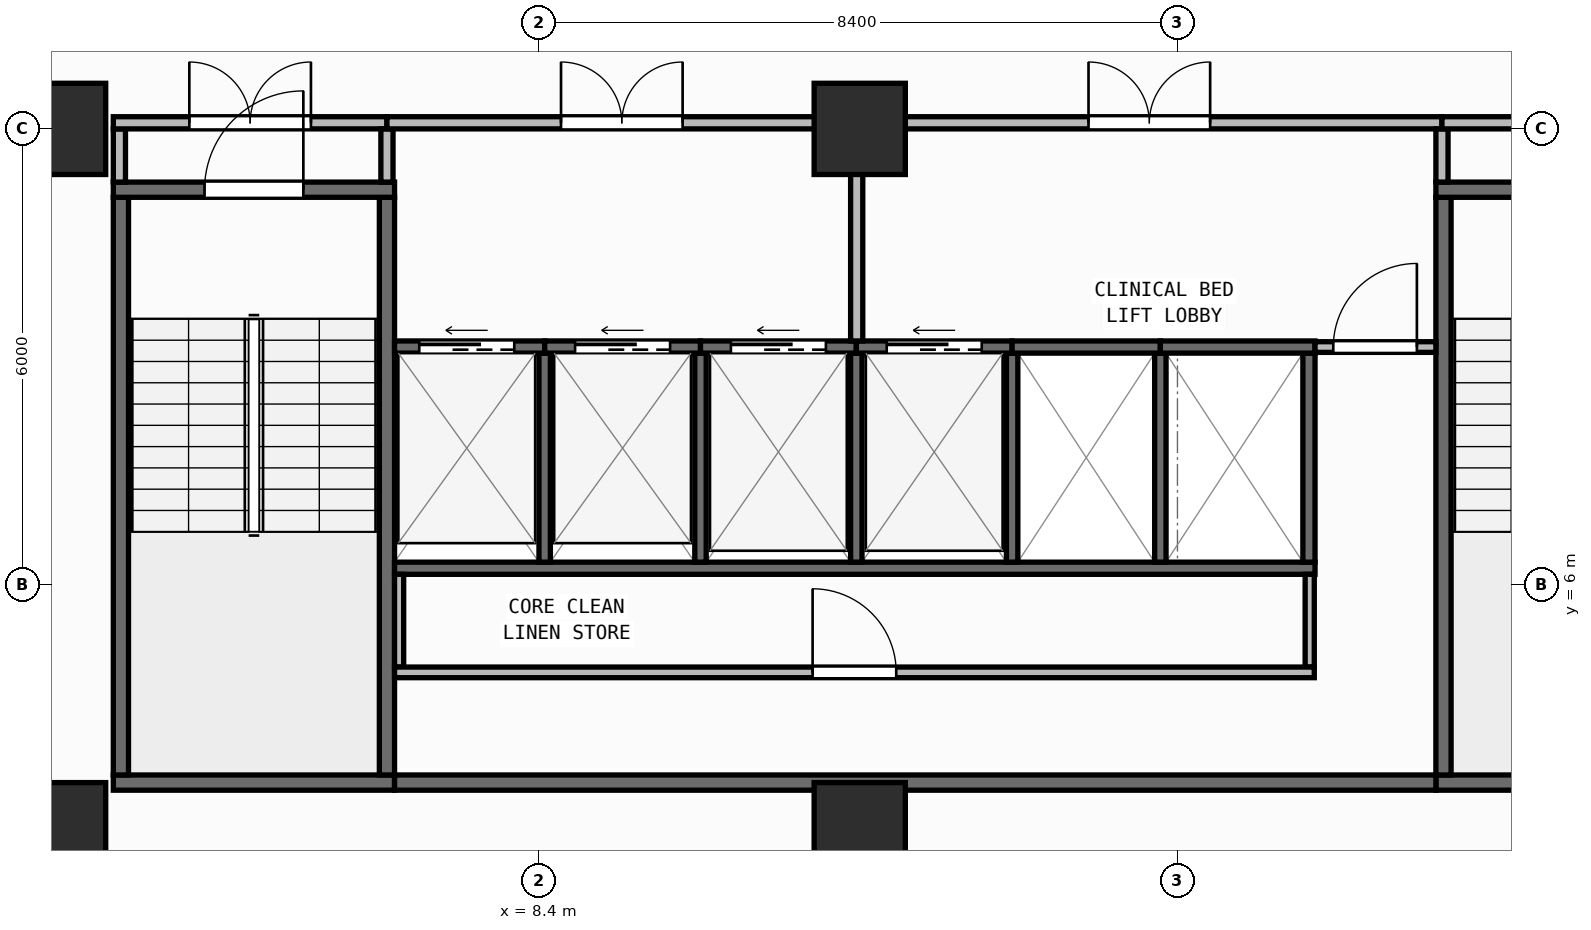
"""IFC4 building model, lengths in metres.
Left out: names, types, materials, properties, quantities, classifications, styles, units other than length and angle.
Written with IfcOpenShell. Run it as: python <this file> out.ifc"""

import sys

from ifc_helpers import new_model, si_unit, direction, frame, frame_2d, origin, origin_2d, place, context, subcontext, project, spatial, rectangle, extrude, element, fill, save


model = new_model("IFC4")
c1 = context("Model", 3, precision=1e-05, world=origin(), true_north=direction((0.0, 1.0)))
c2 = subcontext(c1, "Body", "Model", "MODEL_VIEW")
j1 = project(units=[si_unit("LENGTHUNIT", "METRE"), si_unit("PLANEANGLEUNIT", "RADIAN")], contexts=[c1])
p1 = place(None, origin())
s1 = spatial("IfcSite", under=j1, at=p1, CompositionType="ELEMENT")
p2 = place(p1, origin())
s2 = spatial("IfcBuilding", under=s1, at=p2, CompositionType="ELEMENT")
p3 = place(p2, frame((0.0, 0.0, 154.7)))
s3 = spatial("IfcBuildingStorey", under=s2, at=p3, CompositionType="ELEMENT", Elevation=154.7)
for number, where, z_axis, x_axis in (
    (1, (2.1, 2.8, 0.0), (0.0, 0.0, 1.0), (1.0, 0.0, 0.0)),
    (2, (12.62, 2.8, 0.0), (0.0, 0.0, 1.0), (1.0, 0.0, 0.0)),
    (3, (2.1, 12.0, 0.0), (0.0, 0.0, 1.0), (1.0, 0.0, 0.0)),
    (4, (12.62, 12.0, 0.0), (0.0, 0.0, 1.0), (1.0, 0.0, 0.0)),
):
    element("IfcColumn", number, at=place(p3, frame(where, z_axis=z_axis, x_axis=x_axis)), inside=s3, PredefinedType="COLUMN", context=c2, shape_type="SweptSolid", body=[
        extrude(rectangle(XDim=1.2, YDim=1.2, at=origin_2d()), origin(), (0.0, 0.0, 1.0), 3.95),
    ])
p4 = place(p3, frame((2.76, 0.173, 0.0), z_axis=(0.0, 0.0, 1.0), x_axis=(0.996857931723, 0.079210251617, 0.0)))
e5 = element("IfcWall", 5, at=p4, inside=s3, PredefinedType="STANDARD", context=c2, shape_type="SweptSolid", body=[
    extrude(rectangle(XDim=51.442, YDim=0.26, at=frame_2d((25.721, 0.0))), origin(), (0.0, 0.0, 1.0), 3.71),
])
p5 = place(p4, frame((24.521, 0.0, 0.9)))
e6 = element("IfcOpeningElement", 6, at=p5, cuts=e5, PredefinedType="OPENING", context=c2, shape_type="SweptSolid", body=[
    extrude(rectangle(XDim=2.4, YDim=1.65, at=frame_2d((1.2, 0.825))), frame((0.0, 0.14, 0.0), z_axis=(0.0, -1.0, 0.0), x_axis=(1.0, 0.0, 0.0)), (0.0, 0.0, 1.0), 0.28),
])
p6 = place(p3, frame((2.8, 3.4, 0.0), z_axis=(0.0, 0.0, 1.0), x_axis=(1.0, 0.0, 0.0)))
e7 = element("IfcWall", 7, at=p6, inside=s3, PredefinedType="SHEAR", context=c2, shape_type="SweptSolid", body=[
    extrude(rectangle(XDim=3.7, YDim=0.2, at=frame_2d((1.85, 0.0))), origin(), (0.0, 0.0, 1.0), 3.71),
])
for number, where, z_axis, x_axis in (
    (8, (2.9, 3.5, 0.0), (0.0, 0.0, 1.0), (0.0, 1.0, 0.0)),
    (9, (6.4, 3.5, 0.0), (0.0, 0.0, 1.0), (0.0, 1.0, 0.0)),
):
    element("IfcWall", number, at=place(p3, frame(where, z_axis=z_axis, x_axis=x_axis)), inside=s3, PredefinedType="SHEAR", context=c2, shape_type="SweptSolid", body=[
        extrude(rectangle(XDim=7.6, YDim=0.2, at=frame_2d((3.8, 0.0))), origin(), (0.0, 0.0, 1.0), 3.71),
    ])
p7 = place(p3, frame((2.8, 11.2, 0.0), z_axis=(0.0, 0.0, 1.0), x_axis=(1.0, 0.0, 0.0)))
e10 = element("IfcWall", 10, at=p7, inside=s3, PredefinedType="SHEAR", context=c2, shape_type="SweptSolid", body=[
    extrude(rectangle(XDim=3.7, YDim=0.2, at=frame_2d((1.85, 0.0))), origin(), (0.0, 0.0, 1.0), 3.71),
])
p8 = place(p7, frame((1.2, 0.0, 0.0)))
e11 = element("IfcOpeningElement", 11, at=p8, cuts=e10, PredefinedType="OPENING", context=c2, shape_type="SweptSolid", body=[
    extrude(rectangle(XDim=1.3, YDim=2.15, at=frame_2d((0.65, 1.075))), frame((0.0, 0.11, 0.0), z_axis=(0.0, -1.0, 0.0), x_axis=(1.0, 0.0, 0.0)), (0.0, 0.0, 1.0), 0.22),
])
p9 = place(p3, frame((20.2, 3.4, 0.0), z_axis=(0.0, 0.0, 1.0), x_axis=(1.0, 0.0, 0.0)))
e12 = element("IfcWall", 12, at=p9, inside=s3, PredefinedType="SHEAR", context=c2, shape_type="SweptSolid", body=[
    extrude(rectangle(XDim=3.7, YDim=0.2, at=frame_2d((1.85, 0.0))), origin(), (0.0, 0.0, 1.0), 3.71),
])
p10 = place(p3, frame((20.3, 3.5, 0.0), z_axis=(0.0, 0.0, 1.0), x_axis=(0.0, 1.0, 0.0)))
e13 = element("IfcWall", 13, at=p10, inside=s3, PredefinedType="SHEAR", context=c2, shape_type="SweptSolid", body=[
    extrude(rectangle(XDim=7.6, YDim=0.2, at=frame_2d((3.8, 0.0))), origin(), (0.0, 0.0, 1.0), 3.71),
])
p11 = place(p3, frame((20.2, 11.2, 0.0), z_axis=(0.0, 0.0, 1.0), x_axis=(1.0, 0.0, 0.0)))
e14 = element("IfcWall", 14, at=p11, inside=s3, PredefinedType="SHEAR", context=c2, shape_type="SweptSolid", body=[
    extrude(rectangle(XDim=3.7, YDim=0.2, at=frame_2d((1.85, 0.0))), origin(), (0.0, 0.0, 1.0), 3.71),
])
p12 = place(p11, frame((1.2, 0.0, 0.0)))
e15 = element("IfcOpeningElement", 15, at=p12, cuts=e14, PredefinedType="OPENING", context=c2, shape_type="SweptSolid", body=[
    extrude(rectangle(XDim=1.3, YDim=2.15, at=frame_2d((0.65, 1.075))), frame((0.0, 0.11, 0.0), z_axis=(0.0, -1.0, 0.0), x_axis=(1.0, 0.0, 0.0)), (0.0, 0.0, 1.0), 0.22),
])
p13 = place(p3, frame((6.5, 3.4, 0.0), z_axis=(0.0, 0.0, 1.0), x_axis=(1.0, 0.0, 0.0)))
e16 = element("IfcWall", 16, at=p13, inside=s3, PredefinedType="SHEAR", context=c2, shape_type="SweptSolid", body=[
    extrude(rectangle(XDim=13.7, YDim=0.2, at=frame_2d((6.85, 0.0))), origin(), (0.0, 0.0, 1.0), 3.71),
])
p14 = place(p3, frame((6.5, 6.22, 0.0), z_axis=(0.0, 0.0, 1.0), x_axis=(1.0, 0.0, 0.0)))
e17 = element("IfcWall", 17, at=p14, inside=s3, PredefinedType="SHEAR", context=c2, shape_type="SweptSolid", body=[
    extrude(rectangle(XDim=12.11, YDim=0.16, at=frame_2d((6.055, 0.0))), origin(), (0.0, 0.0, 1.0), 3.71),
])
p15 = place(p3, frame((18.53, 6.3, 0.0), z_axis=(0.0, 0.0, 1.0), x_axis=(0.0, 1.0, 0.0)))
e18 = element("IfcWall", 18, at=p15, inside=s3, PredefinedType="SHEAR", context=c2, shape_type="SweptSolid", body=[
    extrude(rectangle(XDim=2.75, YDim=0.16, at=frame_2d((1.375, 0.0))), origin(), (0.0, 0.0, 1.0), 3.71),
])
for number, where, z_axis, x_axis in (
    (19, (8.475, 6.3, 0.0), (0.0, 0.0, 1.0), (0.0, 1.0, 0.0)),
    (20, (10.525, 6.3, 0.0), (0.0, 0.0, 1.0), (0.0, 1.0, 0.0)),
    (21, (12.575, 6.3, 0.0), (0.0, 0.0, 1.0), (0.0, 1.0, 0.0)),
    (22, (14.625, 6.3, 0.0), (0.0, 0.0, 1.0), (0.0, 1.0, 0.0)),
    (23, (16.575, 6.3, 0.0), (0.0, 0.0, 1.0), (0.0, 1.0, 0.0)),
):
    element("IfcWall", number, at=place(p3, frame(where, z_axis=z_axis, x_axis=x_axis)), inside=s3, PredefinedType="SHEAR", context=c2, shape_type="SweptSolid", body=[
        extrude(rectangle(XDim=2.75, YDim=0.15, at=frame_2d((1.375, 0.0))), origin(), (0.0, 0.0, 1.0), 3.71),
    ])
p16 = place(p3, frame((6.5, 9.13, 0.0), z_axis=(0.0, 0.0, 1.0), x_axis=(1.0, 0.0, 0.0)))
e24 = element("IfcWall", 24, at=p16, inside=s3, PredefinedType="SHEAR", context=c2, shape_type="SweptSolid", body=[
    extrude(rectangle(XDim=1.975, YDim=0.16, at=frame_2d((0.988, 0.0))), origin(), (0.0, 0.0, 1.0), 3.71),
])
p17 = place(p16, frame((0.325, 0.0, 0.0)))
e25 = element("IfcOpeningElement", 25, at=p17, cuts=e24, PredefinedType="OPENING", context=c2, shape_type="SweptSolid", body=[
    extrude(rectangle(XDim=1.25, YDim=2.15, at=frame_2d((0.625, 1.075))), frame((0.0, 0.09, 0.0), z_axis=(0.0, -1.0, 0.0), x_axis=(1.0, 0.0, 0.0)), (0.0, 0.0, 1.0), 0.18),
])
p18 = place(p3, frame((8.475, 9.13, 0.0), z_axis=(0.0, 0.0, 1.0), x_axis=(1.0, 0.0, 0.0)))
e26 = element("IfcWall", 26, at=p18, inside=s3, PredefinedType="SHEAR", context=c2, shape_type="SweptSolid", body=[
    extrude(rectangle(XDim=2.05, YDim=0.16, at=frame_2d((1.025, 0.0))), origin(), (0.0, 0.0, 1.0), 3.71),
])
p19 = place(p18, frame((0.4, 0.0, 0.0)))
e27 = element("IfcOpeningElement", 27, at=p19, cuts=e26, PredefinedType="OPENING", context=c2, shape_type="SweptSolid", body=[
    extrude(rectangle(XDim=1.25, YDim=2.15, at=frame_2d((0.625, 1.075))), frame((0.0, 0.09, 0.0), z_axis=(0.0, -1.0, 0.0), x_axis=(1.0, 0.0, 0.0)), (0.0, 0.0, 1.0), 0.18),
])
p20 = place(p3, frame((10.525, 9.13, 0.0), z_axis=(0.0, 0.0, 1.0), x_axis=(1.0, 0.0, 0.0)))
e28 = element("IfcWall", 28, at=p20, inside=s3, PredefinedType="SHEAR", context=c2, shape_type="SweptSolid", body=[
    extrude(rectangle(XDim=2.05, YDim=0.16, at=frame_2d((1.025, 0.0))), origin(), (0.0, 0.0, 1.0), 3.71),
])
p21 = place(p20, frame((0.4, 0.0, 0.0)))
e29 = element("IfcOpeningElement", 29, at=p21, cuts=e28, PredefinedType="OPENING", context=c2, shape_type="SweptSolid", body=[
    extrude(rectangle(XDim=1.25, YDim=2.15, at=frame_2d((0.625, 1.075))), frame((0.0, 0.09, 0.0), z_axis=(0.0, -1.0, 0.0), x_axis=(1.0, 0.0, 0.0)), (0.0, 0.0, 1.0), 0.18),
])
p22 = place(p3, frame((12.575, 9.13, 0.0), z_axis=(0.0, 0.0, 1.0), x_axis=(1.0, 0.0, 0.0)))
e30 = element("IfcWall", 30, at=p22, inside=s3, PredefinedType="SHEAR", context=c2, shape_type="SweptSolid", body=[
    extrude(rectangle(XDim=2.05, YDim=0.16, at=frame_2d((1.025, 0.0))), origin(), (0.0, 0.0, 1.0), 3.71),
])
p23 = place(p22, frame((0.4, 0.0, 0.0)))
e31 = element("IfcOpeningElement", 31, at=p23, cuts=e30, PredefinedType="OPENING", context=c2, shape_type="SweptSolid", body=[
    extrude(rectangle(XDim=1.25, YDim=2.15, at=frame_2d((0.625, 1.075))), frame((0.0, 0.09, 0.0), z_axis=(0.0, -1.0, 0.0), x_axis=(1.0, 0.0, 0.0)), (0.0, 0.0, 1.0), 0.18),
])
p24 = place(p3, frame((14.625, 9.13, 0.0), z_axis=(0.0, 0.0, 1.0), x_axis=(1.0, 0.0, 0.0)))
e32 = element("IfcWall", 32, at=p24, inside=s3, PredefinedType="SHEAR", context=c2, shape_type="SweptSolid", body=[
    extrude(rectangle(XDim=1.95, YDim=0.16, at=frame_2d((0.975, 0.0))), origin(), (0.0, 0.0, 1.0), 3.71),
])
p25 = place(p3, frame((16.575, 9.13, 0.0), z_axis=(0.0, 0.0, 1.0), x_axis=(1.0, 0.0, 0.0)))
e33 = element("IfcWall", 33, at=p25, inside=s3, PredefinedType="SHEAR", context=c2, shape_type="SweptSolid", body=[
    extrude(rectangle(XDim=2.035, YDim=0.16, at=frame_2d((1.018, 0.0))), origin(), (0.0, 0.0, 1.0), 3.71),
])
for number, where, z_axis, x_axis in (
    (34, (6.56, 4.92, 0.0), (0.0, 0.0, 1.0), (0.0, 1.0, 0.0)),
    (35, (18.54, 4.92, 0.0), (0.0, 0.0, 1.0), (0.0, 1.0, 0.0)),
):
    element("IfcWall", number, at=place(p3, frame(where, z_axis=z_axis, x_axis=x_axis)), inside=s3, PredefinedType="PARTITIONING", context=c2, shape_type="SweptSolid", body=[
        extrude(rectangle(XDim=1.22, YDim=0.12, at=frame_2d((0.61, 0.0))), origin(), (0.0, 0.0, 1.0), 3.71),
    ])
p26 = place(p3, frame((6.5, 4.85, 0.0), z_axis=(0.0, 0.0, 1.0), x_axis=(1.0, 0.0, 0.0)))
e36 = element("IfcWall", 36, at=p26, inside=s3, PredefinedType="PARTITIONING", context=c2, shape_type="SweptSolid", body=[
    extrude(rectangle(XDim=12.1, YDim=0.14, at=frame_2d((6.05, 0.0))), origin(), (0.0, 0.0, 1.0), 3.71),
])
p27 = place(p26, frame((5.5, 0.0, 0.0)))
e37 = element("IfcOpeningElement", 37, at=p27, cuts=e36, PredefinedType="OPENING", context=c2, shape_type="SweptSolid", body=[
    extrude(rectangle(XDim=1.1, YDim=2.1, at=frame_2d((0.55, 1.05))), frame((0.0, 0.08, 0.0), z_axis=(0.0, -1.0, 0.0), x_axis=(1.0, 0.0, 0.0)), (0.0, 0.0, 1.0), 0.16),
])
p28 = place(p3, frame((18.61, 9.13, 0.0), z_axis=(0.0, 0.0, 1.0), x_axis=(1.0, 0.0, 0.0)))
e38 = element("IfcWall", 38, at=p28, inside=s3, PredefinedType="PARTITIONING", context=c2, shape_type="SweptSolid", body=[
    extrude(rectangle(XDim=1.59, YDim=0.14, at=frame_2d((0.795, 0.0))), origin(), (0.0, 0.0, 1.0), 3.71),
])
p29 = place(p28, frame((0.24, 0.0, 0.0)))
e39 = element("IfcOpeningElement", 39, at=p29, cuts=e38, PredefinedType="OPENING", context=c2, shape_type="SweptSolid", body=[
    extrude(rectangle(XDim=1.1, YDim=2.1, at=frame_2d((0.55, 1.05))), frame((0.0, 0.08, 0.0), z_axis=(0.0, -1.0, 0.0), x_axis=(1.0, 0.0, 0.0)), (0.0, 0.0, 1.0), 0.16),
])
p30 = place(p3, frame((2.88, 11.3, 0.0), z_axis=(0.0, 0.0, 1.0), x_axis=(0.0, 1.0, 0.0)))
e40 = element("IfcWall", 40, at=p30, inside=s3, PredefinedType="PARTITIONING", context=c2, shape_type="SweptSolid", body=[
    extrude(rectangle(XDim=0.7, YDim=0.16, at=frame_2d((0.35, 0.0))), origin(), (0.0, 0.0, 1.0), 3.71),
])
p31 = place(p3, frame((2.8, 12.08, 0.0), z_axis=(0.0, 0.0, 1.0), x_axis=(1.0, 0.0, 0.0)))
e41 = element("IfcWall", 41, at=p31, inside=s3, PredefinedType="PARTITIONING", context=c2, shape_type="SweptSolid", body=[
    extrude(rectangle(XDim=3.6, YDim=0.16, at=frame_2d((1.8, 0.0))), origin(), (0.0, 0.0, 1.0), 3.083),
])
p32 = place(p31, frame((1.0, 0.0, 0.0)))
e42 = element("IfcOpeningElement", 42, at=p32, cuts=e41, PredefinedType="OPENING", context=c2, shape_type="SweptSolid", body=[
    extrude(rectangle(XDim=1.6, YDim=2.05, at=frame_2d((0.8, 1.025))), frame((0.0, 0.09, 0.0), z_axis=(0.0, -1.0, 0.0), x_axis=(1.0, 0.0, 0.0)), (0.0, 0.0, 1.0), 0.18),
])
p33 = place(p3, frame((6.4, 11.3, 0.0), z_axis=(0.0, 0.0, 1.0), x_axis=(0.0, 1.0, 0.0)))
e43 = element("IfcWall", 43, at=p33, inside=s3, PredefinedType="PARTITIONING", context=c2, shape_type="SweptSolid", body=[
    extrude(rectangle(XDim=0.7, YDim=0.16, at=frame_2d((0.35, 0.0))), origin(), (0.0, 0.0, 1.0), 3.71),
])
p34 = place(p3, frame((6.4, 12.08, 0.0), z_axis=(0.0, 0.0, 1.0), x_axis=(1.0, 0.0, 0.0)))
e44 = element("IfcWall", 44, at=p34, inside=s3, PredefinedType="PARTITIONING", context=c2, shape_type="SweptSolid", body=[
    extrude(rectangle(XDim=6.18, YDim=0.16, at=frame_2d((3.09, 0.0))), origin(), (0.0, 0.0, 1.0), 3.083),
])
p35 = place(p34, frame((2.29, 0.0, 0.0)))
e45 = element("IfcOpeningElement", 45, at=p35, cuts=e44, PredefinedType="OPENING", context=c2, shape_type="SweptSolid", body=[
    extrude(rectangle(XDim=1.6, YDim=2.05, at=frame_2d((0.8, 1.025))), frame((0.0, 0.09, 0.0), z_axis=(0.0, -1.0, 0.0), x_axis=(1.0, 0.0, 0.0)), (0.0, 0.0, 1.0), 0.18),
])
p36 = place(p3, frame((12.58, 9.21, 0.0), z_axis=(0.0, 0.0, 1.0), x_axis=(0.0, 1.0, 0.0)))
e46 = element("IfcWall", 46, at=p36, inside=s3, PredefinedType="PARTITIONING", context=c2, shape_type="SweptSolid", body=[
    extrude(rectangle(XDim=2.79, YDim=0.16, at=frame_2d((1.395, 0.0))), origin(), (0.0, 0.0, 1.0), 3.71),
])
p37 = place(p3, frame((12.58, 12.08, 0.0), z_axis=(0.0, 0.0, 1.0), x_axis=(1.0, 0.0, 0.0)))
e47 = element("IfcWall", 47, at=p37, inside=s3, PredefinedType="PARTITIONING", context=c2, shape_type="SweptSolid", body=[
    extrude(rectangle(XDim=7.7, YDim=0.16, at=frame_2d((3.85, 0.0))), origin(), (0.0, 0.0, 1.0), 3.083),
])
p38 = place(p37, frame((3.05, 0.0, 0.0)))
e48 = element("IfcOpeningElement", 48, at=p38, cuts=e47, PredefinedType="OPENING", context=c2, shape_type="SweptSolid", body=[
    extrude(rectangle(XDim=1.6, YDim=2.05, at=frame_2d((0.8, 1.025))), frame((0.0, 0.09, 0.0), z_axis=(0.0, -1.0, 0.0), x_axis=(1.0, 0.0, 0.0)), (0.0, 0.0, 1.0), 0.18),
])
p39 = place(p3, frame((20.28, 11.3, 0.0), z_axis=(0.0, 0.0, 1.0), x_axis=(0.0, 1.0, 0.0)))
e49 = element("IfcWall", 49, at=p39, inside=s3, PredefinedType="PARTITIONING", context=c2, shape_type="SweptSolid", body=[
    extrude(rectangle(XDim=0.7, YDim=0.16, at=frame_2d((0.35, 0.0))), origin(), (0.0, 0.0, 1.0), 3.71),
])
p40 = place(p3, frame((20.28, 12.08, 0.0), z_axis=(0.0, 0.0, 1.0), x_axis=(1.0, 0.0, 0.0)))
e50 = element("IfcWall", 50, at=p40, inside=s3, PredefinedType="PARTITIONING", context=c2, shape_type="SweptSolid", body=[
    extrude(rectangle(XDim=3.62, YDim=0.16, at=frame_2d((1.81, 0.0))), origin(), (0.0, 0.0, 1.0), 3.083),
])
p41 = place(p40, frame((1.01, 0.0, 0.0)))
e51 = element("IfcOpeningElement", 51, at=p41, cuts=e50, PredefinedType="OPENING", context=c2, shape_type="SweptSolid", body=[
    extrude(rectangle(XDim=1.6, YDim=2.05, at=frame_2d((0.8, 1.025))), frame((0.0, 0.09, 0.0), z_axis=(0.0, -1.0, 0.0), x_axis=(1.0, 0.0, 0.0)), (0.0, 0.0, 1.0), 0.18),
])
p42 = place(p8, origin())
e52 = element("IfcDoor", 52, at=p42, inside=s3, OperationType="SINGLE_SWING_RIGHT", PredefinedType="DOOR", context=c2, shape_type="SweptSolid", body=[
    extrude(rectangle(XDim=1.3, YDim=2.15, at=frame_2d((0.65, 1.075))), frame((0.0, 0.025, 0.0), z_axis=(0.0, -1.0, 0.0), x_axis=(1.0, 0.0, 0.0)), (0.0, 0.0, 1.0), 0.05),
])
fill(e11, e52)
p43 = place(p17, origin())
e53 = element("IfcDoor", 53, at=p43, inside=s3, OperationType="SLIDING_TO_LEFT", PredefinedType="DOOR", context=c2, shape_type="SweptSolid", body=[
    extrude(rectangle(XDim=1.25, YDim=2.15, at=frame_2d((0.625, 1.075))), frame((0.0, 0.025, 0.0), z_axis=(0.0, -1.0, 0.0), x_axis=(1.0, 0.0, 0.0)), (0.0, 0.0, 1.0), 0.05),
])
fill(e25, e53)
p44 = place(p19, origin())
e54 = element("IfcDoor", 54, at=p44, inside=s3, OperationType="SLIDING_TO_LEFT", PredefinedType="DOOR", context=c2, shape_type="SweptSolid", body=[
    extrude(rectangle(XDim=1.25, YDim=2.15, at=frame_2d((0.625, 1.075))), frame((0.0, 0.025, 0.0), z_axis=(0.0, -1.0, 0.0), x_axis=(1.0, 0.0, 0.0)), (0.0, 0.0, 1.0), 0.05),
])
fill(e27, e54)
p45 = place(p21, origin())
e55 = element("IfcDoor", 55, at=p45, inside=s3, OperationType="SLIDING_TO_LEFT", PredefinedType="DOOR", context=c2, shape_type="SweptSolid", body=[
    extrude(rectangle(XDim=1.25, YDim=2.15, at=frame_2d((0.625, 1.075))), frame((0.0, 0.025, 0.0), z_axis=(0.0, -1.0, 0.0), x_axis=(1.0, 0.0, 0.0)), (0.0, 0.0, 1.0), 0.05),
])
fill(e29, e55)
p46 = place(p23, origin())
e56 = element("IfcDoor", 56, at=p46, inside=s3, OperationType="SLIDING_TO_LEFT", PredefinedType="DOOR", context=c2, shape_type="SweptSolid", body=[
    extrude(rectangle(XDim=1.25, YDim=2.15, at=frame_2d((0.625, 1.075))), frame((0.0, 0.025, 0.0), z_axis=(0.0, -1.0, 0.0), x_axis=(1.0, 0.0, 0.0)), (0.0, 0.0, 1.0), 0.05),
])
fill(e31, e56)
p47 = place(p27, origin())
e57 = element("IfcDoor", 57, at=p47, inside=s3, OperationType="SINGLE_SWING_LEFT", PredefinedType="DOOR", context=c2, shape_type="SweptSolid", body=[
    extrude(rectangle(XDim=1.1, YDim=2.1, at=frame_2d((0.55, 1.05))), frame((0.0, 0.025, 0.0), z_axis=(0.0, -1.0, 0.0), x_axis=(1.0, 0.0, 0.0)), (0.0, 0.0, 1.0), 0.05),
])
fill(e37, e57)
p48 = place(p29, origin())
e58 = element("IfcDoor", 58, at=p48, inside=s3, OperationType="SINGLE_SWING_RIGHT", PredefinedType="DOOR", context=c2, shape_type="SweptSolid", body=[
    extrude(rectangle(XDim=1.1, YDim=2.1, at=frame_2d((0.55, 1.05))), frame((0.0, 0.025, 0.0), z_axis=(0.0, -1.0, 0.0), x_axis=(1.0, 0.0, 0.0)), (0.0, 0.0, 1.0), 0.05),
])
fill(e39, e58)
p49 = place(p32, origin())
e59 = element("IfcDoor", 59, at=p49, inside=s3, OperationType="DOUBLE_DOOR_SINGLE_SWING", PredefinedType="DOOR", context=c2, shape_type="SweptSolid", body=[
    extrude(rectangle(XDim=1.6, YDim=2.05, at=frame_2d((0.8, 1.025))), frame((0.0, 0.025, 0.0), z_axis=(0.0, -1.0, 0.0), x_axis=(1.0, 0.0, 0.0)), (0.0, 0.0, 1.0), 0.05),
])
fill(e42, e59)
p50 = place(p35, origin())
e60 = element("IfcDoor", 60, at=p50, inside=s3, OperationType="DOUBLE_DOOR_SINGLE_SWING", PredefinedType="DOOR", context=c2, shape_type="SweptSolid", body=[
    extrude(rectangle(XDim=1.6, YDim=2.05, at=frame_2d((0.8, 1.025))), frame((0.0, 0.025, 0.0), z_axis=(0.0, -1.0, 0.0), x_axis=(1.0, 0.0, 0.0)), (0.0, 0.0, 1.0), 0.05),
])
fill(e45, e60)
p51 = place(p38, origin())
e61 = element("IfcDoor", 61, at=p51, inside=s3, OperationType="DOUBLE_DOOR_SINGLE_SWING", PredefinedType="DOOR", context=c2, shape_type="SweptSolid", body=[
    extrude(rectangle(XDim=1.6, YDim=2.05, at=frame_2d((0.8, 1.025))), frame((0.0, 0.025, 0.0), z_axis=(0.0, -1.0, 0.0), x_axis=(1.0, 0.0, 0.0)), (0.0, 0.0, 1.0), 0.05),
])
fill(e48, e61)
save(model, sys.argv[1])
